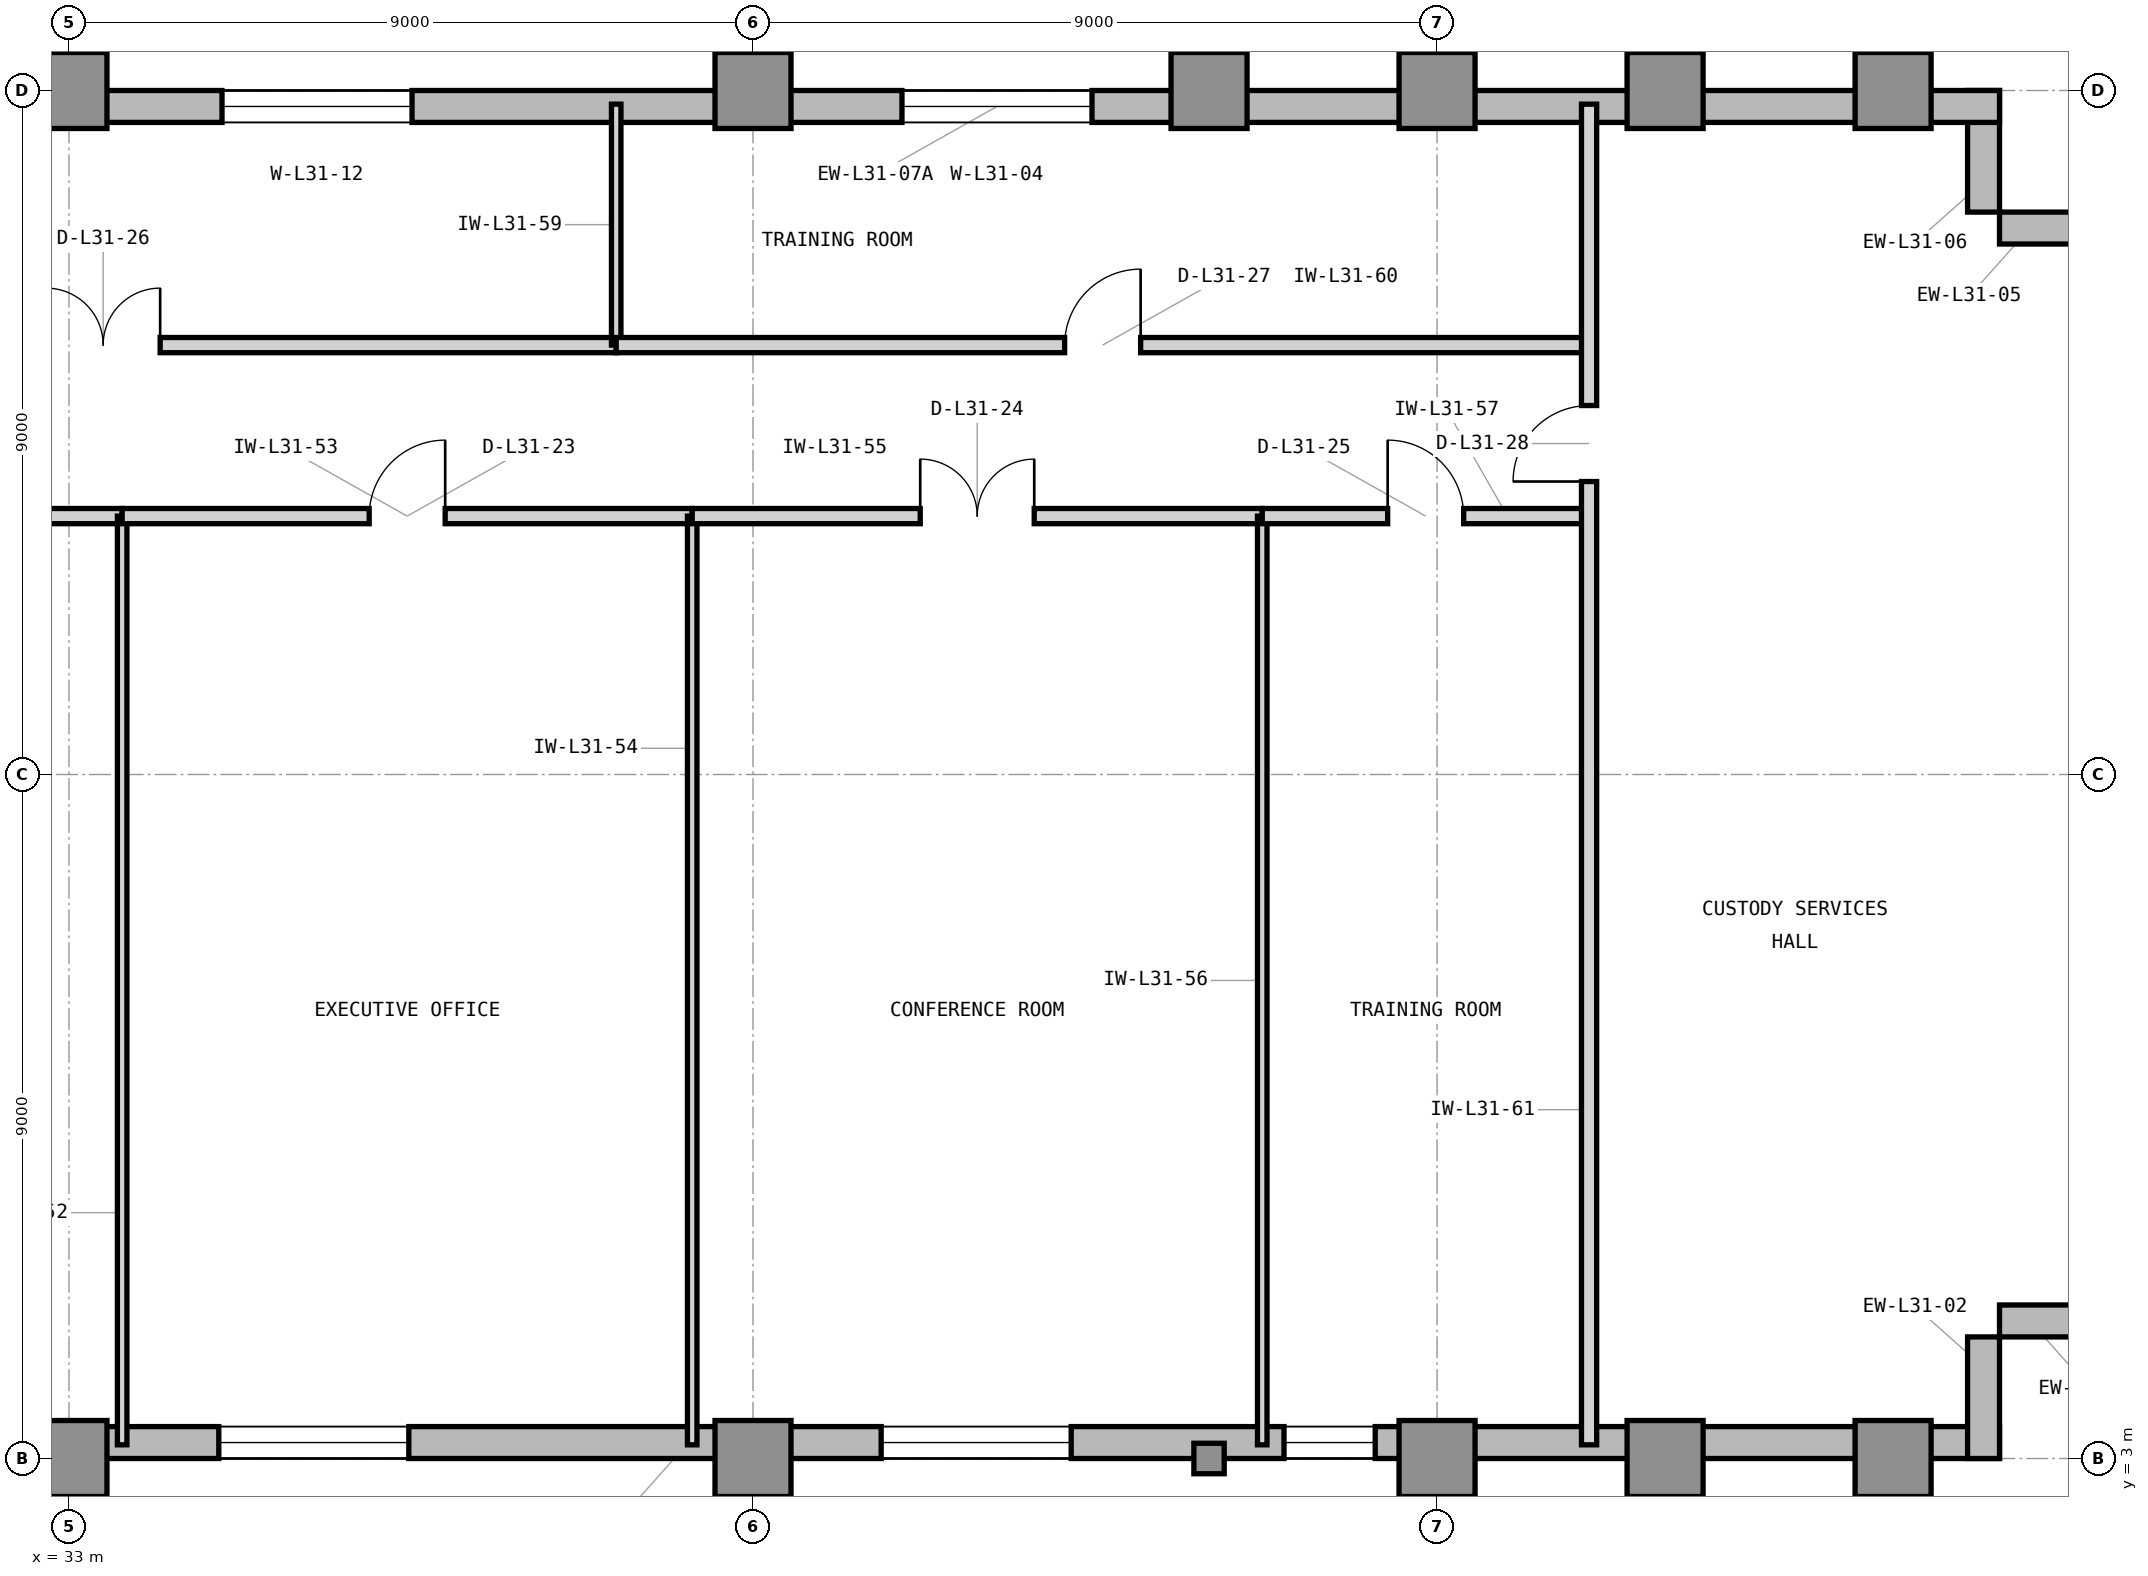
"""IFC4 building model, lengths in metres.
Left out: names, types, materials, properties, quantities, classifications, styles, units other than length and angle.
Written with IfcOpenShell. Run it as: python <this file> out.ifc"""

import sys

from ifc_helpers import new_model, si_unit, direction, frame, frame_2d, origin, origin_2d, place, context, subcontext, project, spatial, rectangle, i_section, extrude, element, fill, save


model = new_model("IFC4")
c1 = context("Model", 3, precision=1e-05, world=origin(), true_north=direction((0.0, 1.0)))
c2 = subcontext(c1, "Body", "Model", "MODEL_VIEW")
j1 = project(units=[si_unit("LENGTHUNIT", "METRE"), si_unit("PLANEANGLEUNIT", "RADIAN")], contexts=[c1])
p1 = place(None, origin())
s1 = spatial("IfcSite", under=j1, at=p1, CompositionType="ELEMENT")
p2 = place(p1, origin())
s2 = spatial("IfcBuilding", under=s1, at=p2, CompositionType="ELEMENT")
p3 = place(p2, frame((0.0, 0.0, 132.3)))
s3 = spatial("IfcBuildingStorey", under=s2, at=p3, CompositionType="ELEMENT", Elevation=132.3)
for number, where, z_axis, x_axis in (
    (1, (33.0, 3.0, 0.0), (0.0, 0.0, 1.0), (1.0, 0.0, 0.0)),
    (2, (33.0, 21.0, 0.0), (0.0, 0.0, 1.0), (1.0, 0.0, 0.0)),
    (3, (42.0, 3.0, 0.0), (0.0, 0.0, 1.0), (1.0, 0.0, 0.0)),
    (4, (42.0, 21.0, 0.0), (0.0, 0.0, 1.0), (1.0, 0.0, 0.0)),
):
    element("IfcColumn", number, at=place(p3, frame(where, z_axis=z_axis, x_axis=x_axis)), inside=s3, PredefinedType="COLUMN", context=c2, shape_type="SweptSolid", body=[
        extrude(rectangle(XDim=1.0, YDim=1.0, at=origin_2d()), origin(), (0.0, 0.0, 1.0), 3.9),
    ])
p4 = place(p3, frame((48.0, 3.0, 0.0), z_axis=(0.0, 0.0, 1.0), x_axis=(1.0, 0.0, 0.0)))
e5 = element("IfcColumn", 5, at=p4, inside=s3, PredefinedType="COLUMN", context=c2, shape_type="SweptSolid", body=[
    extrude(i_section(OverallWidth=0.401, OverallDepth=0.399, WebThickness=0.025, FlangeThickness=0.04, FilletRadius=0.032, at=origin_2d()), origin(), (0.0, 0.0, 1.0), 3.9),
])
for number, where, z_axis, x_axis in (
    (6, (48.0, 21.0, 0.0), (0.0, 0.0, 1.0), (1.0, 0.0, 0.0)),
    (7, (51.0, 3.0, 0.0), (0.0, 0.0, 1.0), (1.0, 0.0, 0.0)),
    (8, (51.0, 21.0, 0.0), (0.0, 0.0, 1.0), (1.0, 0.0, 0.0)),
    (9, (54.0, 3.0, 0.0), (0.0, 0.0, 1.0), (1.0, 0.0, 0.0)),
    (10, (54.0, 21.0, 0.0), (0.0, 0.0, 1.0), (1.0, 0.0, 0.0)),
    (11, (57.0, 3.0, 0.0), (0.0, 0.0, 1.0), (1.0, 0.0, 0.0)),
    (12, (57.0, 21.0, 0.0), (0.0, 0.0, 1.0), (1.0, 0.0, 0.0)),
):
    element("IfcColumn", number, at=place(p3, frame(where, z_axis=z_axis, x_axis=x_axis)), inside=s3, PredefinedType="COLUMN", context=c2, shape_type="SweptSolid", body=[
        extrude(rectangle(XDim=1.0, YDim=1.0, at=origin_2d()), origin(), (0.0, 0.0, 1.0), 3.9),
    ])
p5 = place(p3, frame((23.9, 3.21, 0.0), z_axis=(0.0, 0.0, 1.0), x_axis=(1.0, 0.0, 0.0)))
e13 = element("IfcWall", 13, at=p5, inside=s3, PredefinedType="STANDARD", context=c2, shape_type="SweptSolid", body=[
    extrude(rectangle(XDim=34.5, YDim=0.42, at=frame_2d((17.25, 0.0))), origin(), (0.0, 0.0, 1.0), 3.7),
])
p6 = place(p5, frame((11.071, 0.0, 0.85)))
e14 = element("IfcOpeningElement", 14, at=p6, cuts=e13, PredefinedType="OPENING", context=c2, shape_type="SweptSolid", body=[
    extrude(rectangle(XDim=2.5, YDim=2.25, at=frame_2d((1.25, 1.125))), frame((0.0, 0.22, 0.0), z_axis=(0.0, -1.0, 0.0), x_axis=(1.0, 0.0, 0.0)), (0.0, 0.0, 1.0), 0.44),
])
p7 = place(p5, frame((1.1, 0.0, 0.85)))
e15 = element("IfcOpeningElement", 15, at=p7, cuts=e13, PredefinedType="OPENING", context=c2, shape_type="SweptSolid", body=[
    extrude(rectangle(XDim=1.2, YDim=2.25, at=frame_2d((0.6, 1.125))), frame((0.0, 0.22, 0.0), z_axis=(0.0, -1.0, 0.0), x_axis=(1.0, 0.0, 0.0)), (0.0, 0.0, 1.0), 0.44),
])
p8 = place(p5, frame((5.036, 0.0, 0.85)))
e16 = element("IfcOpeningElement", 16, at=p8, cuts=e13, PredefinedType="OPENING", context=c2, shape_type="SweptSolid", body=[
    extrude(rectangle(XDim=2.5, YDim=2.25, at=frame_2d((1.25, 1.125))), frame((0.0, 0.22, 0.0), z_axis=(0.0, -1.0, 0.0), x_axis=(1.0, 0.0, 0.0)), (0.0, 0.0, 1.0), 0.44),
])
p9 = place(p5, frame((19.786, 0.0, 0.85)))
e17 = element("IfcOpeningElement", 17, at=p9, cuts=e13, PredefinedType="OPENING", context=c2, shape_type="SweptSolid", body=[
    extrude(rectangle(XDim=2.5, YDim=2.25, at=frame_2d((1.25, 1.125))), frame((0.0, 0.22, 0.0), z_axis=(0.0, -1.0, 0.0), x_axis=(1.0, 0.0, 0.0)), (0.0, 0.0, 1.0), 0.44),
])
p10 = place(p5, frame((25.086, 0.0, 0.85)))
e18 = element("IfcOpeningElement", 18, at=p10, cuts=e13, PredefinedType="OPENING", context=c2, shape_type="SweptSolid", body=[
    extrude(rectangle(XDim=1.2, YDim=2.25, at=frame_2d((0.6, 1.125))), frame((0.0, 0.22, 0.0), z_axis=(0.0, -1.0, 0.0), x_axis=(1.0, 0.0, 0.0)), (0.0, 0.0, 1.0), 0.44),
])
for number, where, z_axis, x_axis in (
    (19, (58.19, 3.0, 0.0), (0.0, 0.0, 1.0), (0.0, 1.0, 0.0)),
    (20, (58.4, 4.81, 0.0), (0.0, 0.0, 1.0), (1.0, 0.0, 0.0)),
    (21, (60.0, 19.19, 0.0), (0.0, 0.0, 1.0), (-1.0, 0.0, 0.0)),
    (22, (58.19, 19.4, 0.0), (0.0, 0.0, 1.0), (0.0, 1.0, 0.0)),
):
    element("IfcWall", number, at=place(p3, frame(where, z_axis=z_axis, x_axis=x_axis)), inside=s3, PredefinedType="STANDARD", context=c2, shape_type="SweptSolid", body=[
        extrude(rectangle(XDim=1.6, YDim=0.42, at=frame_2d((0.8, 0.0))), origin(), (0.0, 0.0, 1.0), 3.7),
    ])
p11 = place(p3, frame((58.4, 20.79, 0.0), z_axis=(0.0, 0.0, 1.0), x_axis=(-1.0, 0.0, 0.0)))
e23 = element("IfcWall", 23, at=p11, inside=s3, PredefinedType="STANDARD", context=c2, shape_type="SweptSolid", body=[
    extrude(rectangle(XDim=26.38, YDim=0.42, at=frame_2d((13.19, 0.0))), origin(), (0.0, 0.0, 1.0), 3.7),
])
p12 = place(p11, frame((11.94, 0.0, 0.85)))
e24 = element("IfcOpeningElement", 24, at=p12, cuts=e23, PredefinedType="OPENING", context=c2, shape_type="SweptSolid", body=[
    extrude(rectangle(XDim=2.5, YDim=2.25, at=frame_2d((1.25, 1.125))), frame((0.0, 0.22, 0.0), z_axis=(0.0, -1.0, 0.0), x_axis=(1.0, 0.0, 0.0)), (0.0, 0.0, 1.0), 0.44),
])
p13 = place(p11, frame((20.886, 0.0, 0.85)))
e25 = element("IfcOpeningElement", 25, at=p13, cuts=e23, PredefinedType="OPENING", context=c2, shape_type="SweptSolid", body=[
    extrude(rectangle(XDim=2.5, YDim=2.25, at=frame_2d((1.25, 1.125))), frame((0.0, 0.22, 0.0), z_axis=(0.0, -1.0, 0.0), x_axis=(1.0, 0.0, 0.0)), (0.0, 0.0, 1.0), 0.44),
])
p14 = place(p3, frame((26.7, 15.4, 0.0), z_axis=(0.0, 0.0, 1.0), x_axis=(1.0, 0.0, 0.0)))
e26 = element("IfcWall", 26, at=p14, inside=s3, PredefinedType="PARTITIONING", context=c2, shape_type="SweptSolid", body=[
    extrude(rectangle(XDim=7.0, YDim=0.2, at=frame_2d((3.5, 0.0))), origin(), (0.0, 0.0, 1.0), 3.69),
])
p15 = place(p14, frame((2.5, 0.0, 0.0)))
e27 = element("IfcOpeningElement", 27, at=p15, cuts=e26, PredefinedType="OPENING", context=c2, shape_type="SweptSolid", body=[
    extrude(rectangle(XDim=2.0, YDim=2.5, at=frame_2d((1.0, 1.25))), frame((0.0, 0.11, 0.0), z_axis=(0.0, -1.0, 0.0), x_axis=(1.0, 0.0, 0.0)), (0.0, 0.0, 1.0), 0.22),
])
p16 = place(p3, frame((33.7, 3.18, 0.0), z_axis=(0.0, 0.0, 1.0), x_axis=(0.0, 1.0, 0.0)))
e28 = element("IfcWall", 28, at=p16, inside=s3, PredefinedType="PARTITIONING", context=c2, shape_type="SweptSolid", body=[
    extrude(rectangle(XDim=12.22, YDim=0.125, at=frame_2d((6.11, 0.0))), origin(), (0.0, 0.0, 1.0), 3.69),
])
p17 = place(p3, frame((33.7, 15.4, 0.0), z_axis=(0.0, 0.0, 1.0), x_axis=(1.0, 0.0, 0.0)))
e29 = element("IfcWall", 29, at=p17, inside=s3, PredefinedType="PARTITIONING", context=c2, shape_type="SweptSolid", body=[
    extrude(rectangle(XDim=7.5, YDim=0.2, at=frame_2d((3.75, 0.0))), origin(), (0.0, 0.0, 1.0), 3.69),
])
p18 = place(p17, frame((3.25, 0.0, 0.0)))
e30 = element("IfcOpeningElement", 30, at=p18, cuts=e29, PredefinedType="OPENING", context=c2, shape_type="SweptSolid", body=[
    extrude(rectangle(XDim=1.0, YDim=2.15, at=frame_2d((0.5, 1.075))), frame((0.0, 0.11, 0.0), z_axis=(0.0, -1.0, 0.0), x_axis=(1.0, 0.0, 0.0)), (0.0, 0.0, 1.0), 0.22),
])
p19 = place(p3, frame((41.2, 3.18, 0.0), z_axis=(0.0, 0.0, 1.0), x_axis=(0.0, 1.0, 0.0)))
e31 = element("IfcWall", 31, at=p19, inside=s3, PredefinedType="PARTITIONING", context=c2, shape_type="SweptSolid", body=[
    extrude(rectangle(XDim=12.22, YDim=0.125, at=frame_2d((6.11, 0.0))), origin(), (0.0, 0.0, 1.0), 3.69),
])
p20 = place(p3, frame((41.2, 15.4, 0.0), z_axis=(0.0, 0.0, 1.0), x_axis=(1.0, 0.0, 0.0)))
e32 = element("IfcWall", 32, at=p20, inside=s3, PredefinedType="PARTITIONING", context=c2, shape_type="SweptSolid", body=[
    extrude(rectangle(XDim=7.5, YDim=0.2, at=frame_2d((3.75, 0.0))), origin(), (0.0, 0.0, 1.0), 3.69),
])
p21 = place(p20, frame((3.0, 0.0, 0.0)))
e33 = element("IfcOpeningElement", 33, at=p21, cuts=e32, PredefinedType="OPENING", context=c2, shape_type="SweptSolid", body=[
    extrude(rectangle(XDim=1.5, YDim=2.3, at=frame_2d((0.75, 1.15))), frame((0.0, 0.11, 0.0), z_axis=(0.0, -1.0, 0.0), x_axis=(1.0, 0.0, 0.0)), (0.0, 0.0, 1.0), 0.22),
])
p22 = place(p3, frame((48.7, 3.18, 0.0), z_axis=(0.0, 0.0, 1.0), x_axis=(0.0, 1.0, 0.0)))
e34 = element("IfcWall", 34, at=p22, inside=s3, PredefinedType="PARTITIONING", context=c2, shape_type="SweptSolid", body=[
    extrude(rectangle(XDim=12.22, YDim=0.125, at=frame_2d((6.11, 0.0))), origin(), (0.0, 0.0, 1.0), 3.69),
])
p23 = place(p3, frame((48.7, 15.4, 0.0), z_axis=(0.0, 0.0, 1.0), x_axis=(1.0, 0.0, 0.0)))
e35 = element("IfcWall", 35, at=p23, inside=s3, PredefinedType="PARTITIONING", context=c2, shape_type="SweptSolid", body=[
    extrude(rectangle(XDim=4.3, YDim=0.2, at=frame_2d((2.15, 0.0))), origin(), (0.0, 0.0, 1.0), 3.69),
])
p24 = place(p23, frame((1.65, 0.0, 0.0)))
e36 = element("IfcOpeningElement", 36, at=p24, cuts=e35, PredefinedType="OPENING", context=c2, shape_type="SweptSolid", body=[
    extrude(rectangle(XDim=1.0, YDim=2.15, at=frame_2d((0.5, 1.075))), frame((0.0, 0.11, 0.0), z_axis=(0.0, -1.0, 0.0), x_axis=(1.0, 0.0, 0.0)), (0.0, 0.0, 1.0), 0.22),
])
p25 = place(p3, frame((26.7, 17.65, 0.0), z_axis=(0.0, 0.0, 1.0), x_axis=(1.0, 0.0, 0.0)))
e37 = element("IfcWall", 37, at=p25, inside=s3, PredefinedType="PARTITIONING", context=c2, shape_type="SweptSolid", body=[
    extrude(rectangle(XDim=13.5, YDim=0.2, at=frame_2d((6.75, 0.0))), origin(), (0.0, 0.0, 1.0), 3.69),
])
p26 = place(p25, frame((6.0, 0.0, 0.0)))
e38 = element("IfcOpeningElement", 38, at=p26, cuts=e37, PredefinedType="OPENING", context=c2, shape_type="SweptSolid", body=[
    extrude(rectangle(XDim=1.5, YDim=2.3, at=frame_2d((0.75, 1.15))), frame((0.0, 0.11, 0.0), z_axis=(0.0, -1.0, 0.0), x_axis=(1.0, 0.0, 0.0)), (0.0, 0.0, 1.0), 0.22),
])
p27 = place(p3, frame((40.2, 17.65, 0.0), z_axis=(0.0, 0.0, 1.0), x_axis=(0.0, 1.0, 0.0)))
e39 = element("IfcWall", 39, at=p27, inside=s3, PredefinedType="PARTITIONING", context=c2, shape_type="SweptSolid", body=[
    extrude(rectangle(XDim=3.17, YDim=0.125, at=frame_2d((1.585, 0.0))), origin(), (0.0, 0.0, 1.0), 3.69),
])
p28 = place(p3, frame((40.2, 17.65, 0.0), z_axis=(0.0, 0.0, 1.0), x_axis=(1.0, 0.0, 0.0)))
e40 = element("IfcWall", 40, at=p28, inside=s3, PredefinedType="PARTITIONING", context=c2, shape_type="SweptSolid", body=[
    extrude(rectangle(XDim=12.8, YDim=0.2, at=frame_2d((6.4, 0.0))), origin(), (0.0, 0.0, 1.0), 3.69),
])
p29 = place(p28, frame((5.9, 0.0, 0.0)))
e41 = element("IfcOpeningElement", 41, at=p29, cuts=e40, PredefinedType="OPENING", context=c2, shape_type="SweptSolid", body=[
    extrude(rectangle(XDim=1.0, YDim=2.15, at=frame_2d((0.5, 1.075))), frame((0.0, 0.11, 0.0), z_axis=(0.0, -1.0, 0.0), x_axis=(1.0, 0.0, 0.0)), (0.0, 0.0, 1.0), 0.22),
])
p30 = place(p3, frame((53.0, 3.18, 0.0), z_axis=(0.0, 0.0, 1.0), x_axis=(0.0, 1.0, 0.0)))
e42 = element("IfcWall", 42, at=p30, inside=s3, PredefinedType="PARTITIONING", context=c2, shape_type="SweptSolid", body=[
    extrude(rectangle(XDim=17.64, YDim=0.2, at=frame_2d((8.82, 0.0))), origin(), (0.0, 0.0, 1.0), 3.69),
])
p31 = place(p30, frame((12.675, 0.0, 0.0)))
e43 = element("IfcOpeningElement", 43, at=p31, cuts=e42, PredefinedType="OPENING", context=c2, shape_type="SweptSolid", body=[
    extrude(rectangle(XDim=1.0, YDim=2.15, at=frame_2d((0.5, 1.075))), frame((0.0, 0.11, 0.0), z_axis=(0.0, -1.0, 0.0), x_axis=(1.0, 0.0, 0.0)), (0.0, 0.0, 1.0), 0.22),
])
p32 = place(p6, origin())
e44 = element("IfcWindow", 44, at=p32, inside=s3, PartitioningType="SINGLE_PANEL", PredefinedType="WINDOW", context=c2, shape_type="SweptSolid", body=[
    extrude(rectangle(XDim=2.5, YDim=2.25, at=frame_2d((1.25, 1.125))), frame((0.0, 0.11, 0.0), z_axis=(0.0, -1.0, 0.0), x_axis=(1.0, 0.0, 0.0)), (0.0, 0.0, 1.0), 0.06),
])
fill(e14, e44)
p33 = place(p12, origin())
e45 = element("IfcWindow", 45, at=p33, inside=s3, PartitioningType="SINGLE_PANEL", PredefinedType="WINDOW", context=c2, shape_type="SweptSolid", body=[
    extrude(rectangle(XDim=2.5, YDim=2.25, at=frame_2d((1.25, 1.125))), frame((0.0, 0.11, 0.0), z_axis=(0.0, -1.0, 0.0), x_axis=(1.0, 0.0, 0.0)), (0.0, 0.0, 1.0), 0.06),
])
fill(e24, e45)
p34 = place(p18, origin())
e46 = element("IfcDoor", 46, at=p34, inside=s3, OperationType="SINGLE_SWING_RIGHT", PredefinedType="DOOR", context=c2, shape_type="SweptSolid", body=[
    extrude(rectangle(XDim=1.0, YDim=2.15, at=frame_2d((0.5, 1.075))), frame((0.0, 0.025, 0.0), z_axis=(0.0, -1.0, 0.0), x_axis=(1.0, 0.0, 0.0)), (0.0, 0.0, 1.0), 0.05),
])
fill(e30, e46)
p35 = place(p21, origin())
e47 = element("IfcDoor", 47, at=p35, inside=s3, OperationType="DOUBLE_DOOR_SINGLE_SWING", PredefinedType="DOOR", context=c2, shape_type="SweptSolid", body=[
    extrude(rectangle(XDim=1.5, YDim=2.3, at=frame_2d((0.75, 1.15))), frame((0.0, 0.025, 0.0), z_axis=(0.0, -1.0, 0.0), x_axis=(1.0, 0.0, 0.0)), (0.0, 0.0, 1.0), 0.05),
])
fill(e33, e47)
p36 = place(p24, origin())
e48 = element("IfcDoor", 48, at=p36, inside=s3, OperationType="SINGLE_SWING_LEFT", PredefinedType="DOOR", context=c2, shape_type="SweptSolid", body=[
    extrude(rectangle(XDim=1.0, YDim=2.15, at=frame_2d((0.5, 1.075))), frame((0.0, 0.025, 0.0), z_axis=(0.0, -1.0, 0.0), x_axis=(1.0, 0.0, 0.0)), (0.0, 0.0, 1.0), 0.05),
])
fill(e36, e48)
p37 = place(p26, origin())
e49 = element("IfcDoor", 49, at=p37, inside=s3, OperationType="DOUBLE_DOOR_SINGLE_SWING", PredefinedType="DOOR", context=c2, shape_type="SweptSolid", body=[
    extrude(rectangle(XDim=1.5, YDim=2.3, at=frame_2d((0.75, 1.15))), frame((0.0, 0.025, 0.0), z_axis=(0.0, -1.0, 0.0), x_axis=(1.0, 0.0, 0.0)), (0.0, 0.0, 1.0), 0.05),
])
fill(e38, e49)
p38 = place(p29, origin())
e50 = element("IfcDoor", 50, at=p38, inside=s3, OperationType="SINGLE_SWING_RIGHT", PredefinedType="DOOR", context=c2, shape_type="SweptSolid", body=[
    extrude(rectangle(XDim=1.0, YDim=2.15, at=frame_2d((0.5, 1.075))), frame((0.0, 0.025, 0.0), z_axis=(0.0, -1.0, 0.0), x_axis=(1.0, 0.0, 0.0)), (0.0, 0.0, 1.0), 0.05),
])
fill(e41, e50)
p39 = place(p31, origin())
e51 = element("IfcDoor", 51, at=p39, inside=s3, OperationType="SINGLE_SWING_LEFT", PredefinedType="DOOR", context=c2, shape_type="SweptSolid", body=[
    extrude(rectangle(XDim=1.0, YDim=2.15, at=frame_2d((0.5, 1.075))), frame((0.0, 0.025, 0.0), z_axis=(0.0, -1.0, 0.0), x_axis=(1.0, 0.0, 0.0)), (0.0, 0.0, 1.0), 0.05),
])
fill(e43, e51)
p40 = place(p9, origin())
e52 = element("IfcWindow", 52, at=p40, inside=s3, PartitioningType="SINGLE_PANEL", PredefinedType="WINDOW", context=c2, shape_type="SweptSolid", body=[
    extrude(rectangle(XDim=2.5, YDim=2.25, at=frame_2d((1.25, 1.125))), frame((0.0, 0.11, 0.0), z_axis=(0.0, -1.0, 0.0), x_axis=(1.0, 0.0, 0.0)), (0.0, 0.0, 1.0), 0.06),
])
fill(e17, e52)
p41 = place(p10, origin())
e53 = element("IfcWindow", 53, at=p41, inside=s3, PartitioningType="SINGLE_PANEL", PredefinedType="WINDOW", context=c2, shape_type="SweptSolid", body=[
    extrude(rectangle(XDim=1.2, YDim=2.25, at=frame_2d((0.6, 1.125))), frame((0.0, 0.11, 0.0), z_axis=(0.0, -1.0, 0.0), x_axis=(1.0, 0.0, 0.0)), (0.0, 0.0, 1.0), 0.06),
])
fill(e18, e53)
p42 = place(p13, origin())
e54 = element("IfcWindow", 54, at=p42, inside=s3, PartitioningType="SINGLE_PANEL", PredefinedType="WINDOW", context=c2, shape_type="SweptSolid", body=[
    extrude(rectangle(XDim=2.5, YDim=2.25, at=frame_2d((1.25, 1.125))), frame((0.0, 0.11, 0.0), z_axis=(0.0, -1.0, 0.0), x_axis=(1.0, 0.0, 0.0)), (0.0, 0.0, 1.0), 0.06),
])
fill(e25, e54)
save(model, sys.argv[1])
